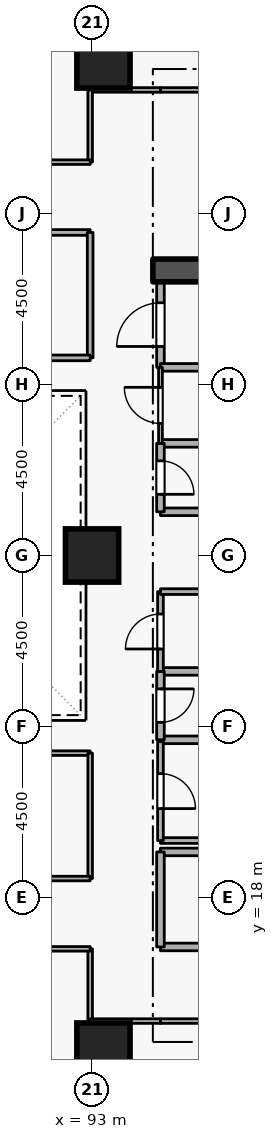
"""IFC4 building model, lengths in metres.
Left out: names, types, materials, properties, quantities, classifications, styles, units other than length and angle.
Written with IfcOpenShell. Run it as: python <this file> out.ifc"""

import sys

from ifc_helpers import new_model, si_unit, direction, frame, frame_2d, origin, origin_2d, place, context, subcontext, project, spatial, rectangle, extrude, element, fill, save


model = new_model("IFC4")
c1 = context("Model", 3, precision=1e-05, world=origin(), true_north=direction((0.0, 1.0)))
c2 = subcontext(c1, "Body", "Model", "MODEL_VIEW")
j1 = project(units=[si_unit("LENGTHUNIT", "METRE"), si_unit("PLANEANGLEUNIT", "RADIAN")], contexts=[c1])
p1 = place(None, origin())
s1 = spatial("IfcSite", under=j1, at=p1, CompositionType="ELEMENT")
p2 = place(p1, origin())
s2 = spatial("IfcBuilding", under=s1, at=p2, CompositionType="ELEMENT")
p3 = place(p2, frame((0.0, 0.0, 45.9)))
s3 = spatial("IfcBuildingStorey", under=s2, at=p3, CompositionType="ELEMENT", Elevation=45.9)
p4 = place(p3, frame((94.6, 34.5, 0.0), z_axis=(0.0, 0.0, 1.0), x_axis=(1.0, 0.0, 0.0)))
e1 = element("IfcWall", 1, at=p4, inside=s3, PredefinedType="SHEAR", context=c2, shape_type="SweptSolid", body=[
    extrude(rectangle(XDim=5.7, YDim=0.6, at=frame_2d((2.85, 0.0))), origin(), (0.0, 0.0, 1.0), 3.6),
])
for number, where, z_axis, x_axis in (
    (2, (93.3, 14.0, 0.0), (0.0, 0.0, 1.0), (1.0, 0.0, 0.0)),
    (3, (93.3, 40.0, 0.0), (0.0, 0.0, 1.0), (1.0, 0.0, 0.0)),
    (4, (93.0, 27.0, 0.0), (0.0, 0.0, 1.0), (1.0, 0.0, 0.0)),
):
    element("IfcColumn", number, at=place(p3, frame(where, z_axis=z_axis, x_axis=x_axis)), inside=s3, PredefinedType="COLUMN", context=c2, shape_type="SweptSolid", body=[
        extrude(rectangle(XDim=1.4, YDim=1.4, at=origin_2d()), origin(), (0.0, 0.0, 1.0), 3.6),
    ])
p5 = place(p3, frame((94.8, 16.7, 0.0), z_axis=(0.0, 0.0, 1.0), x_axis=(1.0, 0.0, 0.0)))
e5 = element("IfcWall", 5, at=p5, inside=s3, PredefinedType="STANDARD", context=c2, shape_type="SweptSolid", body=[
    extrude(rectangle(XDim=5.7, YDim=0.2, at=frame_2d((2.85, 0.0))), origin(), (0.0, 0.0, 1.0), 3.26),
])
p6 = place(p5, frame((2.275, 0.0, 0.0)))
e6 = element("IfcOpeningElement", 6, at=p6, cuts=e5, PredefinedType="OPENING", context=c2, shape_type="SweptSolid", body=[
    extrude(rectangle(XDim=1.15, YDim=2.1, at=frame_2d((0.575, 1.05))), frame((0.0, 0.11, 0.0), z_axis=(0.0, -1.0, 0.0), x_axis=(1.0, 0.0, 0.0)), (0.0, 0.0, 1.0), 0.22),
])
p7 = place(p3, frame((97.1, 19.2, 0.0), z_axis=(0.0, 0.0, 1.0), x_axis=(-1.0, 0.0, 0.0)))
e7 = element("IfcWall", 7, at=p7, inside=s3, PredefinedType="STANDARD", context=c2, shape_type="SweptSolid", body=[
    extrude(rectangle(XDim=2.3, YDim=0.2, at=frame_2d((1.15, 0.0))), origin(), (0.0, 0.0, 1.0), 2.465),
])
p8 = place(p3, frame((94.8, 19.2, 0.0), z_axis=(0.0, 0.0, 1.0), x_axis=(0.0, -1.0, 0.0)))
e8 = element("IfcWall", 8, at=p8, inside=s3, PredefinedType="STANDARD", context=c2, shape_type="SweptSolid", body=[
    extrude(rectangle(XDim=2.5, YDim=0.2, at=frame_2d((1.25, 0.0))), origin(), (0.0, 0.0, 1.0), 3.26),
])
for number, where, z_axis, x_axis in (
    (9, (94.8, 28.15, 0.0), (0.0, 0.0, 1.0), (1.0, 0.0, 0.0)),
    (10, (96.85, 29.95, 0.0), (0.0, 0.0, 1.0), (-1.0, 0.0, 0.0)),
):
    element("IfcWall", number, at=place(p3, frame(where, z_axis=z_axis, x_axis=x_axis)), inside=s3, PredefinedType="STANDARD", context=c2, shape_type="SweptSolid", body=[
        extrude(rectangle(XDim=2.05, YDim=0.2, at=frame_2d((1.025, 0.0))), origin(), (0.0, 0.0, 1.0), 3.26),
    ])
p9 = place(p3, frame((94.8, 29.95, 0.0), z_axis=(0.0, 0.0, 1.0), x_axis=(0.0, -1.0, 0.0)))
e11 = element("IfcWall", 11, at=p9, inside=s3, PredefinedType="STANDARD", context=c2, shape_type="SweptSolid", body=[
    extrude(rectangle(XDim=1.8, YDim=0.2, at=frame_2d((0.9, 0.0))), origin(), (0.0, 0.0, 1.0), 3.26),
])
p10 = place(p9, frame((0.46, 0.0, 0.0)))
e12 = element("IfcOpeningElement", 12, at=p10, cuts=e11, PredefinedType="OPENING", context=c2, shape_type="SweptSolid", body=[
    extrude(rectangle(XDim=0.88, YDim=2.04, at=frame_2d((0.44, 1.02))), frame((0.0, 0.11, 0.0), z_axis=(0.0, -1.0, 0.0), x_axis=(1.0, 0.0, 0.0)), (0.0, 0.0, 1.0), 0.22),
])
for number, where, z_axis, x_axis in (
    (13, (94.8, 22.15, 0.0), (0.0, 0.0, 1.0), (1.0, 0.0, 0.0)),
    (14, (96.85, 23.95, 0.0), (0.0, 0.0, 1.0), (-1.0, 0.0, 0.0)),
):
    element("IfcWall", number, at=place(p3, frame(where, z_axis=z_axis, x_axis=x_axis)), inside=s3, PredefinedType="STANDARD", context=c2, shape_type="SweptSolid", body=[
        extrude(rectangle(XDim=2.05, YDim=0.2, at=frame_2d((1.025, 0.0))), origin(), (0.0, 0.0, 1.0), 3.26),
    ])
p11 = place(p3, frame((94.8, 23.95, 0.0), z_axis=(0.0, 0.0, 1.0), x_axis=(0.0, -1.0, 0.0)))
e15 = element("IfcWall", 15, at=p11, inside=s3, PredefinedType="STANDARD", context=c2, shape_type="SweptSolid", body=[
    extrude(rectangle(XDim=1.8, YDim=0.2, at=frame_2d((0.9, 0.0))), origin(), (0.0, 0.0, 1.0), 3.26),
])
p12 = place(p11, frame((0.46, 0.0, 0.0)))
e16 = element("IfcOpeningElement", 16, at=p12, cuts=e15, PredefinedType="OPENING", context=c2, shape_type="SweptSolid", body=[
    extrude(rectangle(XDim=0.88, YDim=2.04, at=frame_2d((0.44, 1.02))), frame((0.0, 0.11, 0.0), z_axis=(0.0, -1.0, 0.0), x_axis=(1.0, 0.0, 0.0)), (0.0, 0.0, 1.0), 0.22),
])
p13 = place(p3, frame((94.8, 31.95, 0.0), z_axis=(0.0, 0.0, 1.0), x_axis=(0.0, 1.0, 0.0)))
e17 = element("IfcWall", 17, at=p13, inside=s3, PredefinedType="STANDARD", context=c2, shape_type="SweptSolid", body=[
    extrude(rectangle(XDim=2.25, YDim=0.2, at=frame_2d((1.125, 0.0))), origin(), (0.0, 0.0, 1.0), 3.26),
])
p14 = place(p13, frame((0.55, 0.0, 0.0)))
e18 = element("IfcOpeningElement", 18, at=p14, cuts=e17, PredefinedType="OPENING", context=c2, shape_type="SweptSolid", body=[
    extrude(rectangle(XDim=1.15, YDim=2.1, at=frame_2d((0.575, 1.05))), frame((0.0, 0.11, 0.0), z_axis=(0.0, -1.0, 0.0), x_axis=(1.0, 0.0, 0.0)), (0.0, 0.0, 1.0), 0.22),
])
p15 = place(p3, frame((96.85, 31.95, 0.0), z_axis=(0.0, 0.0, 1.0), x_axis=(-1.0, 0.0, 0.0)))
e19 = element("IfcWall", 19, at=p15, inside=s3, PredefinedType="STANDARD", context=c2, shape_type="SweptSolid", body=[
    extrude(rectangle(XDim=2.05, YDim=0.2, at=frame_2d((1.025, 0.0))), origin(), (0.0, 0.0, 1.0), 3.26),
])
p16 = place(p3, frame((94.8, 19.5, 0.0), z_axis=(0.0, 0.0, 1.0), x_axis=(1.0, 0.0, 0.0)))
e20 = element("IfcWall", 20, at=p16, inside=s3, PredefinedType="PARTITIONING", context=c2, shape_type="SweptSolid", body=[
    extrude(rectangle(XDim=2.05, YDim=0.15, at=frame_2d((1.025, 0.0))), origin(), (0.0, 0.0, 1.0), 2.465),
])
p17 = place(p3, frame((94.8, 22.1, 0.0), z_axis=(0.0, 0.0, 1.0), x_axis=(0.0, -1.0, 0.0)))
e21 = element("IfcWall", 21, at=p17, inside=s3, PredefinedType="PARTITIONING", context=c2, shape_type="SweptSolid", body=[
    extrude(rectangle(XDim=2.6, YDim=0.15, at=frame_2d((1.3, 0.0))), origin(), (0.0, 0.0, 1.0), 3.26),
])
p18 = place(p17, frame((0.84, 0.0, 0.0)))
e22 = element("IfcOpeningElement", 22, at=p18, cuts=e21, PredefinedType="OPENING", context=c2, shape_type="SweptSolid", body=[
    extrude(rectangle(XDim=0.92, YDim=2.08, at=frame_2d((0.46, 1.04))), frame((0.0, 0.085, 0.0), z_axis=(0.0, -1.0, 0.0), x_axis=(1.0, 0.0, 0.0)), (0.0, 0.0, 1.0), 0.17),
])
p19 = place(p3, frame((94.8, 23.95, 0.0), z_axis=(0.0, 0.0, 1.0), x_axis=(0.0, 1.0, 0.0)))
e23 = element("IfcWall", 23, at=p19, inside=s3, PredefinedType="PARTITIONING", context=c2, shape_type="SweptSolid", body=[
    extrude(rectangle(XDim=2.1, YDim=0.15, at=frame_2d((1.05, 0.0))), origin(), (0.0, 0.0, 1.0), 3.26),
])
p20 = place(p19, frame((0.59, 0.0, 0.0)))
e24 = element("IfcOpeningElement", 24, at=p20, cuts=e23, PredefinedType="OPENING", context=c2, shape_type="SweptSolid", body=[
    extrude(rectangle(XDim=0.92, YDim=2.08, at=frame_2d((0.46, 1.04))), frame((0.0, 0.085, 0.0), z_axis=(0.0, -1.0, 0.0), x_axis=(1.0, 0.0, 0.0)), (0.0, 0.0, 1.0), 0.17),
])
p21 = place(p3, frame((94.8, 26.05, 0.0), z_axis=(0.0, 0.0, 1.0), x_axis=(1.0, 0.0, 0.0)))
e25 = element("IfcWall", 25, at=p21, inside=s3, PredefinedType="PARTITIONING", context=c2, shape_type="SweptSolid", body=[
    extrude(rectangle(XDim=2.05, YDim=0.15, at=frame_2d((1.025, 0.0))), origin(), (0.0, 0.0, 1.0), 3.26),
])
p22 = place(p3, frame((94.8, 29.95, 0.0), z_axis=(0.0, 0.0, 1.0), x_axis=(0.0, 1.0, 0.0)))
e26 = element("IfcWall", 26, at=p22, inside=s3, PredefinedType="PARTITIONING", context=c2, shape_type="SweptSolid", body=[
    extrude(rectangle(XDim=2.0, YDim=0.1, at=frame_2d((1.0, 0.0))), origin(), (0.0, 0.0, 1.0), 3.26),
])
p23 = place(p22, frame((0.525, 0.0, 0.0)))
e27 = element("IfcOpeningElement", 27, at=p23, cuts=e26, PredefinedType="OPENING", context=c2, shape_type="SweptSolid", body=[
    extrude(rectangle(XDim=0.95, YDim=2.1, at=frame_2d((0.475, 1.05))), frame((0.0, 0.06, 0.0), z_axis=(0.0, -1.0, 0.0), x_axis=(1.0, 0.0, 0.0)), (0.0, 0.0, 1.0), 0.12),
])
p24 = place(p3, frame((92.95, 16.65, 0.0), z_axis=(0.0, 0.0, 1.0), x_axis=(0.0, -1.0, 0.0)))
e28 = element("IfcWall", 28, at=p24, inside=s3, PredefinedType="PARTITIONING", context=c2, shape_type="SweptSolid", body=[
    extrude(rectangle(XDim=1.9, YDim=0.12, at=frame_2d((0.95, 0.0))), origin(), (0.0, 0.0, 1.0), 3.26),
])
p25 = place(p3, frame((92.95, 14.75, 0.0), z_axis=(0.0, 0.0, 1.0), x_axis=(1.0, 0.0, 0.0)))
e29 = element("IfcWall", 29, at=p25, inside=s3, PredefinedType="PARTITIONING", context=c2, shape_type="SweptSolid", body=[
    extrude(rectangle(XDim=1.85, YDim=0.12, at=frame_2d((0.925, 0.0))), origin(), (0.0, 0.0, 1.0), 3.26),
])
p26 = place(p3, frame((94.8, 14.75, 0.0), z_axis=(0.0, 0.0, 1.0), x_axis=(1.0, 0.0, 0.0)))
e30 = element("IfcWall", 30, at=p26, inside=s3, PredefinedType="PARTITIONING", context=c2, shape_type="SweptSolid", body=[
    extrude(rectangle(XDim=9.35, YDim=0.12, at=frame_2d((4.675, 0.0))), origin(), (0.0, 0.0, 1.0), 3.26),
])
p27 = place(p26, frame((4.15, 0.0, 0.0)))
e31 = element("IfcOpeningElement", 31, at=p27, cuts=e30, PredefinedType="OPENING", context=c2, shape_type="SweptSolid", body=[
    extrude(rectangle(XDim=1.05, YDim=2.1, at=frame_2d((0.525, 1.05))), frame((0.0, 0.07, 0.0), z_axis=(0.0, -1.0, 0.0), x_axis=(1.0, 0.0, 0.0)), (0.0, 0.0, 1.0), 0.14),
])
p28 = place(p3, frame((88.5, 16.65, 0.0), z_axis=(0.0, 0.0, 1.0), x_axis=(1.0, 0.0, 0.0)))
e32 = element("IfcWall", 32, at=p28, inside=s3, PredefinedType="PARTITIONING", context=c2, shape_type="SweptSolid", body=[
    extrude(rectangle(XDim=4.45, YDim=0.12, at=frame_2d((2.225, 0.0))), origin(), (0.0, 0.0, 1.0), 3.26),
])
p29 = place(p3, frame((97.95, 39.25, 0.0), z_axis=(0.0, 0.0, 1.0), x_axis=(-1.0, 0.0, 0.0)))
e33 = element("IfcWall", 33, at=p29, inside=s3, PredefinedType="PARTITIONING", context=c2, shape_type="SweptSolid", body=[
    extrude(rectangle(XDim=3.15, YDim=0.12, at=frame_2d((1.575, 0.0))), origin(), (0.0, 0.0, 1.0), 3.26),
])
p30 = place(p3, frame((94.8, 39.25, 0.0), z_axis=(0.0, 0.0, 1.0), x_axis=(-1.0, 0.0, 0.0)))
e34 = element("IfcWall", 34, at=p30, inside=s3, PredefinedType="PARTITIONING", context=c2, shape_type="SweptSolid", body=[
    extrude(rectangle(XDim=1.85, YDim=0.12, at=frame_2d((0.925, 0.0))), origin(), (0.0, 0.0, 1.0), 3.26),
])
p31 = place(p3, frame((92.95, 39.25, 0.0), z_axis=(0.0, 0.0, 1.0), x_axis=(0.0, -1.0, 0.0)))
e35 = element("IfcWall", 35, at=p31, inside=s3, PredefinedType="PARTITIONING", context=c2, shape_type="SweptSolid", body=[
    extrude(rectangle(XDim=1.9, YDim=0.12, at=frame_2d((0.95, 0.0))), origin(), (0.0, 0.0, 1.0), 3.26),
])
p32 = place(p3, frame((92.95, 37.35, 0.0), z_axis=(0.0, 0.0, 1.0), x_axis=(-1.0, 0.0, 0.0)))
e36 = element("IfcWall", 36, at=p32, inside=s3, PredefinedType="PARTITIONING", context=c2, shape_type="SweptSolid", body=[
    extrude(rectangle(XDim=4.45, YDim=0.12, at=frame_2d((2.225, 0.0))), origin(), (0.0, 0.0, 1.0), 3.26),
])
p33 = place(p32, frame((1.7, 0.0, 0.0)))
e37 = element("IfcOpeningElement", 37, at=p33, cuts=e36, PredefinedType="OPENING", context=c2, shape_type="SweptSolid", body=[
    extrude(rectangle(XDim=1.05, YDim=2.1, at=frame_2d((0.525, 1.05))), frame((0.0, 0.07, 0.0), z_axis=(0.0, -1.0, 0.0), x_axis=(1.0, 0.0, 0.0)), (0.0, 0.0, 1.0), 0.14),
])
p34 = place(p3, frame((84.05, 35.5, 0.0), z_axis=(0.0, 0.0, 1.0), x_axis=(1.0, 0.0, 0.0)))
e38 = element("IfcWall", 38, at=p34, inside=s3, PredefinedType="PARTITIONING", context=c2, shape_type="SweptSolid", body=[
    extrude(rectangle(XDim=8.9, YDim=0.15, at=frame_2d((4.45, 0.0))), origin(), (0.0, 0.0, 1.0), 3.26),
])
p35 = place(p34, frame((2.48, 0.0, 0.0)))
e39 = element("IfcOpeningElement", 39, at=p35, cuts=e38, PredefinedType="OPENING", context=c2, shape_type="SweptSolid", body=[
    extrude(rectangle(XDim=1.3, YDim=2.12, at=frame_2d((0.65, 1.06))), frame((0.0, 0.085, 0.0), z_axis=(0.0, -1.0, 0.0), x_axis=(1.0, 0.0, 0.0)), (0.0, 0.0, 1.0), 0.17),
])
p36 = place(p3, frame((92.95, 35.5, 0.0), z_axis=(0.0, 0.0, 1.0), x_axis=(0.0, -1.0, 0.0)))
e40 = element("IfcWall", 40, at=p36, inside=s3, PredefinedType="PARTITIONING", context=c2, shape_type="SweptSolid", body=[
    extrude(rectangle(XDim=3.3, YDim=0.15, at=frame_2d((1.65, 0.0))), origin(), (0.0, 0.0, 1.0), 3.26),
])
p37 = place(p3, frame((92.95, 32.2, 0.0), z_axis=(0.0, 0.0, 1.0), x_axis=(-1.0, 0.0, 0.0)))
e41 = element("IfcWall", 41, at=p37, inside=s3, PredefinedType="PARTITIONING", context=c2, shape_type="SweptSolid", body=[
    extrude(rectangle(XDim=8.9, YDim=0.15, at=frame_2d((4.45, 0.0))), origin(), (0.0, 0.0, 1.0), 3.26),
])
p38 = place(p3, frame((84.05, 21.8, 0.0), z_axis=(0.0, 0.0, 1.0), x_axis=(1.0, 0.0, 0.0)))
e42 = element("IfcWall", 42, at=p38, inside=s3, PredefinedType="PARTITIONING", context=c2, shape_type="SweptSolid", body=[
    extrude(rectangle(XDim=8.9, YDim=0.12, at=frame_2d((4.45, 0.0))), origin(), (0.0, 0.0, 1.0), 3.26),
])
p39 = place(p3, frame((92.95, 21.8, 0.0), z_axis=(0.0, 0.0, 1.0), x_axis=(0.0, -1.0, 0.0)))
e43 = element("IfcWall", 43, at=p39, inside=s3, PredefinedType="PARTITIONING", context=c2, shape_type="SweptSolid", body=[
    extrude(rectangle(XDim=3.3, YDim=0.12, at=frame_2d((1.65, 0.0))), origin(), (0.0, 0.0, 1.0), 3.26),
])
p40 = place(p3, frame((92.95, 18.5, 0.0), z_axis=(0.0, 0.0, 1.0), x_axis=(-1.0, 0.0, 0.0)))
e44 = element("IfcWall", 44, at=p40, inside=s3, PredefinedType="PARTITIONING", context=c2, shape_type="SweptSolid", body=[
    extrude(rectangle(XDim=8.9, YDim=0.12, at=frame_2d((4.45, 0.0))), origin(), (0.0, 0.0, 1.0), 3.26),
])
p41 = place(p40, frame((3.975, 0.0, 0.0)))
e45 = element("IfcOpeningElement", 45, at=p41, cuts=e44, PredefinedType="OPENING", context=c2, shape_type="SweptSolid", body=[
    extrude(rectangle(XDim=0.95, YDim=2.1, at=frame_2d((0.475, 1.05))), frame((0.0, 0.07, 0.0), z_axis=(0.0, -1.0, 0.0), x_axis=(1.0, 0.0, 0.0)), (0.0, 0.0, 1.0), 0.14),
])
p42 = place(p10, origin())
e46 = element("IfcDoor", 46, at=p42, inside=s3, OperationType="SINGLE_SWING_RIGHT", PredefinedType="DOOR", context=c2, shape_type="SweptSolid", body=[
    extrude(rectangle(XDim=0.88, YDim=2.04, at=frame_2d((0.44, 1.02))), frame((0.0, 0.025, 0.0), z_axis=(0.0, -1.0, 0.0), x_axis=(1.0, 0.0, 0.0)), (0.0, 0.0, 1.0), 0.05),
])
fill(e12, e46)
p43 = place(p12, origin())
e47 = element("IfcDoor", 47, at=p43, inside=s3, OperationType="SINGLE_SWING_LEFT", PredefinedType="DOOR", context=c2, shape_type="SweptSolid", body=[
    extrude(rectangle(XDim=0.88, YDim=2.04, at=frame_2d((0.44, 1.02))), frame((0.0, 0.025, 0.0), z_axis=(0.0, -1.0, 0.0), x_axis=(1.0, 0.0, 0.0)), (0.0, 0.0, 1.0), 0.05),
])
fill(e16, e47)
p44 = place(p18, origin())
e48 = element("IfcDoor", 48, at=p44, inside=s3, OperationType="SINGLE_SWING_RIGHT", PredefinedType="DOOR", context=c2, shape_type="SweptSolid", body=[
    extrude(rectangle(XDim=0.92, YDim=2.08, at=frame_2d((0.46, 1.04))), frame((0.0, 0.025, 0.0), z_axis=(0.0, -1.0, 0.0), x_axis=(1.0, 0.0, 0.0)), (0.0, 0.0, 1.0), 0.05),
])
fill(e22, e48)
p45 = place(p20, origin())
e49 = element("IfcDoor", 49, at=p45, inside=s3, OperationType="SINGLE_SWING_LEFT", PredefinedType="DOOR", context=c2, shape_type="SweptSolid", body=[
    extrude(rectangle(XDim=0.92, YDim=2.08, at=frame_2d((0.46, 1.04))), frame((0.0, 0.025, 0.0), z_axis=(0.0, -1.0, 0.0), x_axis=(1.0, 0.0, 0.0)), (0.0, 0.0, 1.0), 0.05),
])
fill(e24, e49)
p46 = place(p23, origin())
e50 = element("IfcDoor", 50, at=p46, inside=s3, OperationType="SINGLE_SWING_RIGHT", PredefinedType="DOOR", context=c2, shape_type="SweptSolid", body=[
    extrude(rectangle(XDim=0.95, YDim=2.1, at=frame_2d((0.475, 1.05))), frame((0.0, 0.025, 0.0), z_axis=(0.0, -1.0, 0.0), x_axis=(1.0, 0.0, 0.0)), (0.0, 0.0, 1.0), 0.05),
])
fill(e27, e50)
p47 = place(p14, origin())
e51 = element("IfcDoor", 51, at=p47, inside=s3, OperationType="SINGLE_SWING_LEFT", PredefinedType="DOOR", context=c2, shape_type="SweptSolid", body=[
    extrude(rectangle(XDim=1.15, YDim=2.1, at=frame_2d((0.575, 1.05))), frame((0.0, 0.025, 0.0), z_axis=(0.0, -1.0, 0.0), x_axis=(1.0, 0.0, 0.0)), (0.0, 0.0, 1.0), 0.05),
])
fill(e18, e51)
save(model, sys.argv[1])
